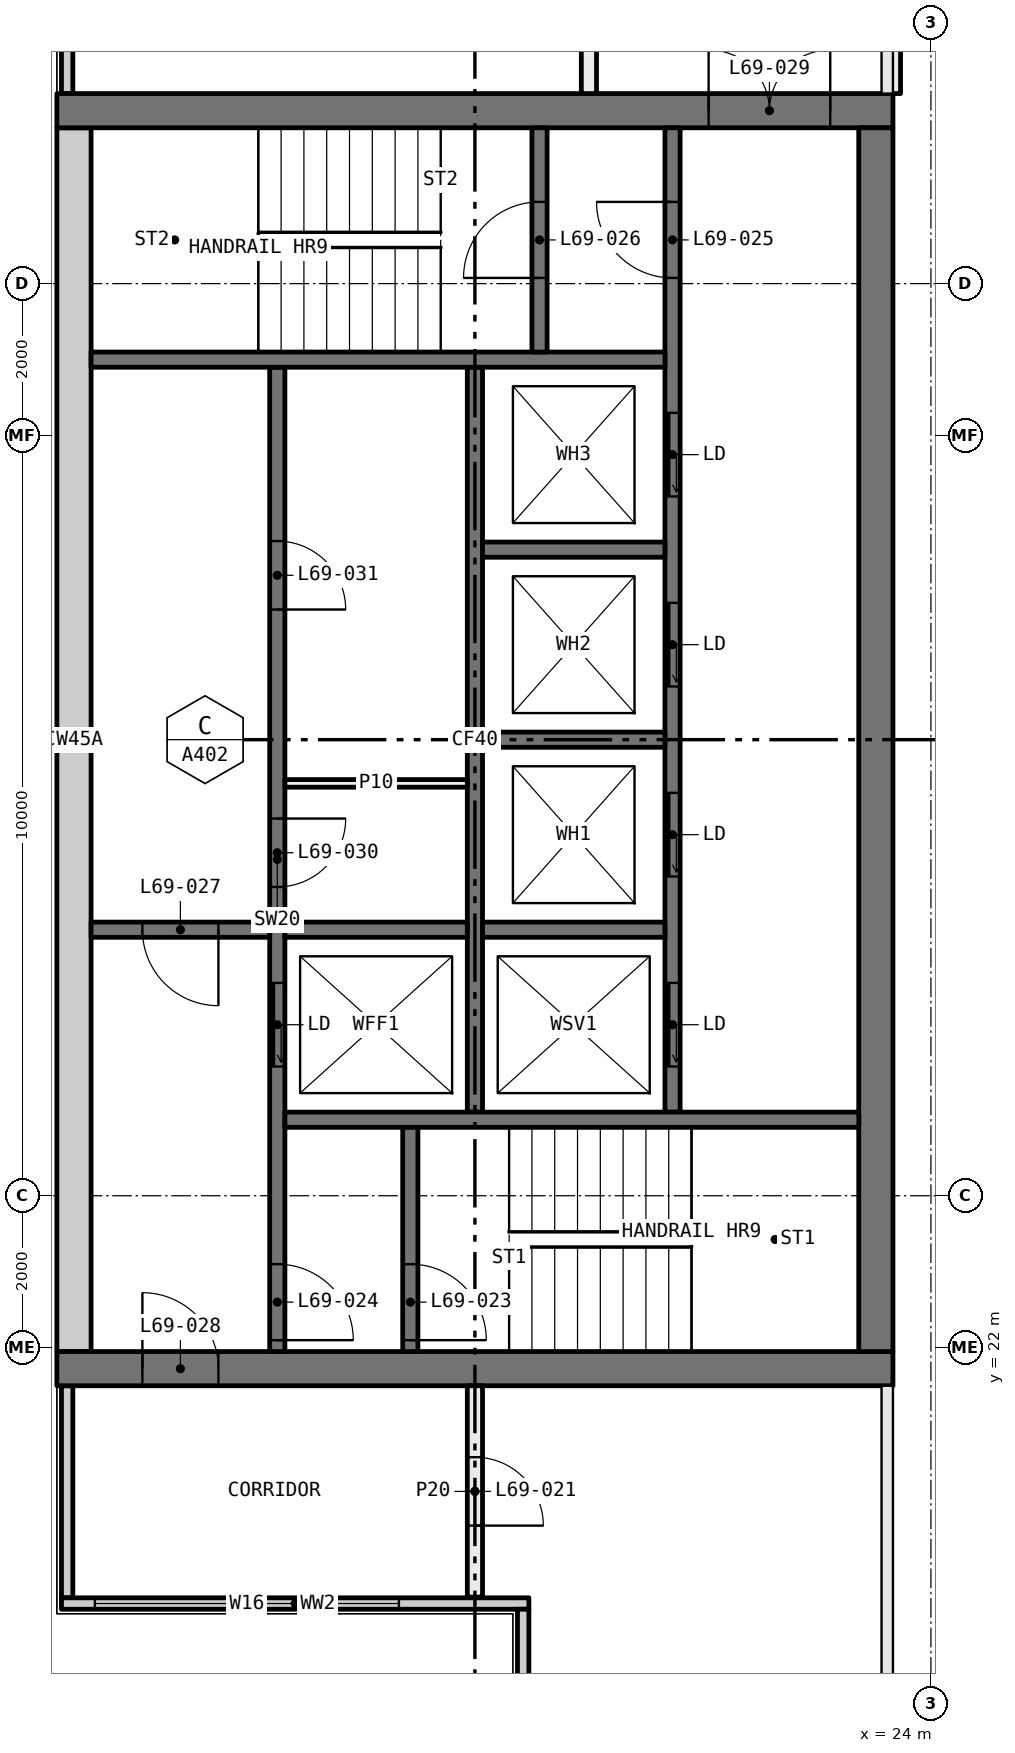
"""IFC4 building model, lengths in metres.
Left out: names, types, materials, properties, quantities, classifications, styles, units other than length and angle.
Written with IfcOpenShell. Run it as: python <this file> out.ifc"""

import sys

from ifc_helpers import new_model, si_unit, direction, frame, frame_2d, origin, place, context, subcontext, project, spatial, rectangle, extrude, element, fill, save


model = new_model("IFC4")
c1 = context("Model", 3, precision=1e-05, world=origin(), true_north=direction((0.0, 1.0)))
c2 = subcontext(c1, "Body", "Model", "MODEL_VIEW")
j1 = project(units=[si_unit("LENGTHUNIT", "METRE"), si_unit("PLANEANGLEUNIT", "RADIAN")], contexts=[c1])
p1 = place(None, origin())
s1 = spatial("IfcSite", under=j1, at=p1, CompositionType="ELEMENT")
p2 = place(p1, origin())
s2 = spatial("IfcBuilding", under=s1, at=p2, CompositionType="ELEMENT")
p3 = place(p2, frame((0.0, 0.0, 255.9)))
s3 = spatial("IfcBuildingStorey", under=s2, at=p3, CompositionType="ELEMENT", Elevation=255.9)
for number, where, z_axis, x_axis in (
    (1, (12.635, 18.71, 0.0), (0.0, 0.0, 1.0), (0.0, 1.0, 0.0)),
    (2, (12.635, 38.5, 0.0), (0.0, 0.0, 1.0), (0.0, 1.0, 0.0)),
):
    element("IfcWall", number, at=place(p3, frame(where, z_axis=z_axis, x_axis=x_axis)), inside=s3, PredefinedType="ELEMENTEDWALL", context=c2, shape_type="SweptSolid", body=[
        extrude(rectangle(XDim=2.79, YDim=0.15, at=frame_2d((1.395, 0.0))), origin(), (0.0, 0.0, 1.0), 3.05),
    ])
p4 = place(p3, frame((12.56, 18.635, 0.0), z_axis=(0.0, 0.0, 1.0), x_axis=(1.0, 0.0, 0.0)))
e3 = element("IfcWall", 3, at=p4, inside=s3, PredefinedType="ELEMENTEDWALL", context=c2, shape_type="SweptSolid", body=[
    extrude(rectangle(XDim=6.15, YDim=0.15, at=frame_2d((3.075, 0.0))), origin(), (0.0, 0.0, 1.0), 3.05),
])
p5 = place(p4, frame((0.44, 0.0, 0.45)))
e4 = element("IfcOpeningElement", 4, at=p5, cuts=e3, PredefinedType="OPENING", context=c2, shape_type="SweptSolid", body=[
    extrude(rectangle(XDim=4.0, YDim=2.55, at=frame_2d((2.0, 1.275))), frame((0.0, 0.085, 0.0), z_axis=(0.0, -1.0, 0.0), x_axis=(1.0, 0.0, 0.0)), (0.0, 0.0, 1.0), 0.17),
])
p6 = place(p3, frame((18.635, 12.71, 0.0), z_axis=(0.0, 0.0, 1.0), x_axis=(0.0, 1.0, 0.0)))
e5 = element("IfcWall", 5, at=p6, inside=s3, PredefinedType="ELEMENTEDWALL", context=c2, shape_type="SweptSolid", body=[
    extrude(rectangle(XDim=5.85, YDim=0.15, at=frame_2d((2.925, 0.0))), origin(), (0.0, 0.0, 1.0), 3.05),
])
p7 = place(p6, frame((0.29, 0.0, 0.45)))
e6 = element("IfcOpeningElement", 6, at=p7, cuts=e5, PredefinedType="OPENING", context=c2, shape_type="SweptSolid", body=[
    extrude(rectangle(XDim=4.0, YDim=2.55, at=frame_2d((2.0, 1.275))), frame((0.0, 0.085, 0.0), z_axis=(0.0, -1.0, 0.0), x_axis=(1.0, 0.0, 0.0)), (0.0, 0.0, 1.0), 0.17),
])
p8 = place(p3, frame((18.0, 21.5, 0.0), z_axis=(0.0, 0.0, 1.0), x_axis=(0.0, -1.0, 0.0)))
e7 = element("IfcWall", 7, at=p8, inside=s3, PredefinedType="PARTITIONING", context=c2, shape_type="SweptSolid", body=[
    extrude(rectangle(XDim=2.78, YDim=0.2, at=frame_2d((1.39, 0.0))), origin(), (0.0, 0.0, 1.0), 3.05),
])
p9 = place(p8, frame((0.94, 0.0, 0.0)))
e8 = element("IfcOpeningElement", 8, at=p9, cuts=e7, PredefinedType="OPENING", context=c2, shape_type="SweptSolid", body=[
    extrude(rectangle(XDim=0.9, YDim=2.1, at=frame_2d((0.45, 1.05))), frame((0.0, 0.11, 0.0), z_axis=(0.0, -1.0, 0.0), x_axis=(1.0, 0.0, 0.0)), (0.0, 0.0, 1.0), 0.22),
])
p10 = place(p3, frame((19.5, 38.5, 0.0), z_axis=(0.0, 0.0, 1.0), x_axis=(0.0, 1.0, 0.0)))
e9 = element("IfcWall", 9, at=p10, inside=s3, PredefinedType="PARTITIONING", context=c2, shape_type="SweptSolid", body=[
    extrude(rectangle(XDim=3.5, YDim=0.2, at=frame_2d((1.75, 0.0))), origin(), (0.0, 0.0, 1.0), 3.05),
])
p11 = place(p3, frame((23.5, 41.9, 0.0), z_axis=(0.0, 0.0, 1.0), x_axis=(0.0, -1.0, 0.0)))
e10 = element("IfcWall", 10, at=p11, inside=s3, PredefinedType="PARTITIONING", context=c2, shape_type="SweptSolid", body=[
    extrude(rectangle(XDim=3.4, YDim=0.2, at=frame_2d((1.7, 0.0))), origin(), (0.0, 0.0, 1.0), 3.05),
])
p12 = place(p3, frame((12.5, 21.725, 0.0), z_axis=(0.0, 0.0, 1.0), x_axis=(1.0, 0.0, 0.0)))
e11 = element("IfcWall", 11, at=p12, inside=s3, PredefinedType="SHEAR", context=c2, shape_type="SweptSolid", body=[
    extrude(rectangle(XDim=11.0, YDim=0.45, at=frame_2d((5.5, 0.0))), origin(), (0.0, 0.0, 1.0), 3.05),
])
p13 = place(p12, frame((1.125, 0.0, 0.0)))
e12 = element("IfcOpeningElement", 12, at=p13, cuts=e11, PredefinedType="OPENING", context=c2, shape_type="SweptSolid", body=[
    extrude(rectangle(XDim=1.0, YDim=2.1, at=frame_2d((0.5, 1.05))), frame((0.0, 0.235, 0.0), z_axis=(0.0, -1.0, 0.0), x_axis=(1.0, 0.0, 0.0)), (0.0, 0.0, 1.0), 0.47),
])
p14 = place(p3, frame((12.5, 38.275, 0.0), z_axis=(0.0, 0.0, 1.0), x_axis=(1.0, 0.0, 0.0)))
e13 = element("IfcWall", 13, at=p14, inside=s3, PredefinedType="SHEAR", context=c2, shape_type="SweptSolid", body=[
    extrude(rectangle(XDim=11.0, YDim=0.45, at=frame_2d((5.5, 0.0))), origin(), (0.0, 0.0, 1.0), 3.05),
])
p15 = place(p14, frame((8.575, 0.0, 0.0)))
e14 = element("IfcOpeningElement", 14, at=p15, cuts=e13, PredefinedType="OPENING", context=c2, shape_type="SweptSolid", body=[
    extrude(rectangle(XDim=1.6, YDim=2.1, at=frame_2d((0.8, 1.05))), frame((0.0, 0.235, 0.0), z_axis=(0.0, -1.0, 0.0), x_axis=(1.0, 0.0, 0.0)), (0.0, 0.0, 1.0), 0.47),
])
for number, where, z_axis, x_axis in (
    (15, (12.725, 21.95, 0.0), (0.0, 0.0, 1.0), (0.0, 1.0, 0.0)),
    (16, (23.275, 21.95, 0.0), (0.0, 0.0, 1.0), (0.0, 1.0, 0.0)),
):
    element("IfcWall", number, at=place(p3, frame(where, z_axis=z_axis, x_axis=x_axis)), inside=s3, PredefinedType="SHEAR", context=c2, shape_type="SweptSolid", body=[
        extrude(rectangle(XDim=16.1, YDim=0.45, at=frame_2d((8.05, 0.0))), origin(), (0.0, 0.0, 1.0), 3.05),
    ])
p16 = place(p3, frame((15.4, 21.95, 0.0), z_axis=(0.0, 0.0, 1.0), x_axis=(0.0, 1.0, 0.0)))
e17 = element("IfcWall", 17, at=p16, inside=s3, PredefinedType="SOLIDWALL", context=c2, shape_type="SweptSolid", body=[
    extrude(rectangle(XDim=12.95, YDim=0.2, at=frame_2d((6.475, 0.0))), origin(), (0.0, 0.0, 1.0), 3.05),
])
p17 = place(p16, frame((3.75, 0.0, 0.0)))
e18 = element("IfcOpeningElement", 18, at=p17, cuts=e17, PredefinedType="OPENING", context=c2, shape_type="SweptSolid", body=[
    extrude(rectangle(XDim=1.1, YDim=2.1, at=frame_2d((0.55, 1.05))), frame((0.0, 0.11, 0.0), z_axis=(0.0, -1.0, 0.0), x_axis=(1.0, 0.0, 0.0)), (0.0, 0.0, 1.0), 0.22),
])
p18 = place(p16, frame((0.15, 0.0, 0.0)))
e19 = element("IfcOpeningElement", 19, at=p18, cuts=e17, PredefinedType="OPENING", context=c2, shape_type="SweptSolid", body=[
    extrude(rectangle(XDim=1.0, YDim=2.1, at=frame_2d((0.5, 1.05))), frame((0.0, 0.11, 0.0), z_axis=(0.0, -1.0, 0.0), x_axis=(1.0, 0.0, 0.0)), (0.0, 0.0, 1.0), 0.22),
])
p19 = place(p16, frame((6.113, 0.0, 0.0)))
e20 = element("IfcOpeningElement", 20, at=p19, cuts=e17, PredefinedType="OPENING", context=c2, shape_type="SweptSolid", body=[
    extrude(rectangle(XDim=0.9, YDim=2.1, at=frame_2d((0.45, 1.05))), frame((0.0, 0.11, 0.0), z_axis=(0.0, -1.0, 0.0), x_axis=(1.0, 0.0, 0.0)), (0.0, 0.0, 1.0), 0.22),
])
p20 = place(p16, frame((9.762, 0.0, 0.0)))
e21 = element("IfcOpeningElement", 21, at=p20, cuts=e17, PredefinedType="OPENING", context=c2, shape_type="SweptSolid", body=[
    extrude(rectangle(XDim=0.9, YDim=2.1, at=frame_2d((0.45, 1.05))), frame((0.0, 0.11, 0.0), z_axis=(0.0, -1.0, 0.0), x_axis=(1.0, 0.0, 0.0)), (0.0, 0.0, 1.0), 0.22),
])
p21 = place(p3, frame((20.6, 25.1, 0.0), z_axis=(0.0, 0.0, 1.0), x_axis=(0.0, 1.0, 0.0)))
e22 = element("IfcWall", 22, at=p21, inside=s3, PredefinedType="SOLIDWALL", context=c2, shape_type="SweptSolid", body=[
    extrude(rectangle(XDim=12.95, YDim=0.2, at=frame_2d((6.475, 0.0))), origin(), (0.0, 0.0, 1.0), 3.05),
])
p22 = place(p21, frame((0.6, 0.0, 0.0)))
e23 = element("IfcOpeningElement", 23, at=p22, cuts=e22, PredefinedType="OPENING", context=c2, shape_type="SweptSolid", body=[
    extrude(rectangle(XDim=1.1, YDim=2.1, at=frame_2d((0.55, 1.05))), frame((0.0, 0.11, 0.0), z_axis=(0.0, -1.0, 0.0), x_axis=(1.0, 0.0, 0.0)), (0.0, 0.0, 1.0), 0.22),
])
p23 = place(p21, frame((3.1, 0.0, 0.0)))
e24 = element("IfcOpeningElement", 24, at=p23, cuts=e22, PredefinedType="OPENING", context=c2, shape_type="SweptSolid", body=[
    extrude(rectangle(XDim=1.1, YDim=2.1, at=frame_2d((0.55, 1.05))), frame((0.0, 0.11, 0.0), z_axis=(0.0, -1.0, 0.0), x_axis=(1.0, 0.0, 0.0)), (0.0, 0.0, 1.0), 0.22),
])
p24 = place(p21, frame((5.6, 0.0, 0.0)))
e25 = element("IfcOpeningElement", 25, at=p24, cuts=e22, PredefinedType="OPENING", context=c2, shape_type="SweptSolid", body=[
    extrude(rectangle(XDim=1.1, YDim=2.1, at=frame_2d((0.55, 1.05))), frame((0.0, 0.11, 0.0), z_axis=(0.0, -1.0, 0.0), x_axis=(1.0, 0.0, 0.0)), (0.0, 0.0, 1.0), 0.22),
])
p25 = place(p21, frame((8.1, 0.0, 0.0)))
e26 = element("IfcOpeningElement", 26, at=p25, cuts=e22, PredefinedType="OPENING", context=c2, shape_type="SweptSolid", body=[
    extrude(rectangle(XDim=1.1, YDim=2.1, at=frame_2d((0.55, 1.05))), frame((0.0, 0.11, 0.0), z_axis=(0.0, -1.0, 0.0), x_axis=(1.0, 0.0, 0.0)), (0.0, 0.0, 1.0), 0.22),
])
p26 = place(p21, frame((10.975, 0.0, 0.0)))
e27 = element("IfcOpeningElement", 27, at=p26, cuts=e22, PredefinedType="OPENING", context=c2, shape_type="SweptSolid", body=[
    extrude(rectangle(XDim=1.0, YDim=2.1, at=frame_2d((0.5, 1.05))), frame((0.0, 0.11, 0.0), z_axis=(0.0, -1.0, 0.0), x_axis=(1.0, 0.0, 0.0)), (0.0, 0.0, 1.0), 0.22),
])
p27 = place(p3, frame((18.0, 25.1, 0.0), z_axis=(0.0, 0.0, 1.0), x_axis=(0.0, 1.0, 0.0)))
e28 = element("IfcWall", 28, at=p27, inside=s3, PredefinedType="SOLIDWALL", context=c2, shape_type="SweptSolid", body=[
    extrude(rectangle(XDim=9.8, YDim=0.2, at=frame_2d((4.9, 0.0))), origin(), (0.0, 0.0, 1.0), 3.05),
])
for number, where, z_axis, x_axis in (
    (29, (15.5, 25.0, 0.0), (0.0, 0.0, 1.0), (1.0, 0.0, 0.0)),
    (30, (12.95, 35.0, 0.0), (0.0, 0.0, 1.0), (1.0, 0.0, 0.0)),
):
    element("IfcWall", number, at=place(p3, frame(where, z_axis=z_axis, x_axis=x_axis)), inside=s3, PredefinedType="SOLIDWALL", context=c2, shape_type="SweptSolid", body=[
        extrude(rectangle(XDim=7.55, YDim=0.2, at=frame_2d((3.775, 0.0))), origin(), (0.0, 0.0, 1.0), 3.05),
    ])
p28 = place(p3, frame((12.95, 27.5, 0.0), z_axis=(0.0, 0.0, 1.0), x_axis=(1.0, 0.0, 0.0)))
e31 = element("IfcWall", 31, at=p28, inside=s3, PredefinedType="SOLIDWALL", context=c2, shape_type="SweptSolid", body=[
    extrude(rectangle(XDim=2.35, YDim=0.2, at=frame_2d((1.175, 0.0))), origin(), (0.0, 0.0, 1.0), 3.05),
])
p29 = place(p28, frame((0.675, 0.0, 0.0)))
e32 = element("IfcOpeningElement", 32, at=p29, cuts=e31, PredefinedType="OPENING", context=c2, shape_type="SweptSolid", body=[
    extrude(rectangle(XDim=1.0, YDim=2.1, at=frame_2d((0.5, 1.05))), frame((0.0, 0.11, 0.0), z_axis=(0.0, -1.0, 0.0), x_axis=(1.0, 0.0, 0.0)), (0.0, 0.0, 1.0), 0.22),
])
p30 = place(p3, frame((17.15, 21.95, 0.0), z_axis=(0.0, 0.0, 1.0), x_axis=(0.0, 1.0, 0.0)))
e33 = element("IfcWall", 33, at=p30, inside=s3, PredefinedType="SOLIDWALL", context=c2, shape_type="SweptSolid", body=[
    extrude(rectangle(XDim=2.95, YDim=0.2, at=frame_2d((1.475, 0.0))), origin(), (0.0, 0.0, 1.0), 3.05),
])
p31 = place(p30, frame((0.15, 0.0, 0.0)))
e34 = element("IfcOpeningElement", 34, at=p31, cuts=e33, PredefinedType="OPENING", context=c2, shape_type="SweptSolid", body=[
    extrude(rectangle(XDim=1.0, YDim=2.1, at=frame_2d((0.5, 1.05))), frame((0.0, 0.11, 0.0), z_axis=(0.0, -1.0, 0.0), x_axis=(1.0, 0.0, 0.0)), (0.0, 0.0, 1.0), 0.22),
])
p32 = place(p3, frame((18.85, 35.1, 0.0), z_axis=(0.0, 0.0, 1.0), x_axis=(0.0, 1.0, 0.0)))
e35 = element("IfcWall", 35, at=p32, inside=s3, PredefinedType="SOLIDWALL", context=c2, shape_type="SweptSolid", body=[
    extrude(rectangle(XDim=2.95, YDim=0.2, at=frame_2d((1.475, 0.0))), origin(), (0.0, 0.0, 1.0), 3.05),
])
p33 = place(p32, frame((0.975, 0.0, 0.0)))
e36 = element("IfcOpeningElement", 36, at=p33, cuts=e35, PredefinedType="OPENING", context=c2, shape_type="SweptSolid", body=[
    extrude(rectangle(XDim=1.0, YDim=2.1, at=frame_2d((0.5, 1.05))), frame((0.0, 0.11, 0.0), z_axis=(0.0, -1.0, 0.0), x_axis=(1.0, 0.0, 0.0)), (0.0, 0.0, 1.0), 0.22),
])
for number, where, z_axis, x_axis in (
    (37, (15.5, 27.5, 0.0), (0.0, 0.0, 1.0), (1.0, 0.0, 0.0)),
    (38, (18.1, 27.5, 0.0), (0.0, 0.0, 1.0), (1.0, 0.0, 0.0)),
    (39, (18.1, 30.0, 0.0), (0.0, 0.0, 1.0), (1.0, 0.0, 0.0)),
    (40, (18.1, 32.5, 0.0), (0.0, 0.0, 1.0), (1.0, 0.0, 0.0)),
):
    element("IfcWall", number, at=place(p3, frame(where, z_axis=z_axis, x_axis=x_axis)), inside=s3, PredefinedType="SOLIDWALL", context=c2, shape_type="SweptSolid", body=[
        extrude(rectangle(XDim=2.4, YDim=0.2, at=frame_2d((1.2, 0.0))), origin(), (0.0, 0.0, 1.0), 3.05),
    ])
p34 = place(p3, frame((15.5, 29.425, 0.0), z_axis=(0.0, 0.0, 1.0), x_axis=(1.0, 0.0, 0.0)))
e41 = element("IfcWall", 41, at=p34, inside=s3, PredefinedType="PARTITIONING", context=c2, shape_type="SweptSolid", body=[
    extrude(rectangle(XDim=2.4, YDim=0.1, at=frame_2d((1.2, 0.0))), origin(), (0.0, 0.0, 1.0), 3.05),
])
p35 = place(p5, origin())
e42 = element("IfcWindow", 42, at=p35, inside=s3, PartitioningType="SINGLE_PANEL", PredefinedType="WINDOW", context=c2, shape_type="SweptSolid", body=[
    extrude(rectangle(XDim=4.0, YDim=2.55, at=frame_2d((2.0, 1.275))), frame((0.0, 0.03, 0.0), z_axis=(0.0, -1.0, 0.0), x_axis=(1.0, 0.0, 0.0)), (0.0, 0.0, 1.0), 0.06),
])
fill(e4, e42)
p36 = place(p9, origin())
e43 = element("IfcDoor", 43, at=p36, inside=s3, OperationType="SINGLE_SWING_LEFT", PredefinedType="DOOR", context=c2, shape_type="SweptSolid", body=[
    extrude(rectangle(XDim=0.9, YDim=2.1, at=frame_2d((0.45, 1.05))), frame((0.0, 0.025, 0.0), z_axis=(0.0, -1.0, 0.0), x_axis=(1.0, 0.0, 0.0)), (0.0, 0.0, 1.0), 0.05),
])
fill(e8, e43)
p37 = place(p22, origin())
e44 = element("IfcDoor", 44, at=p37, inside=s3, OperationType="SLIDING_TO_LEFT", PredefinedType="DOOR", context=c2, shape_type="SweptSolid", body=[
    extrude(rectangle(XDim=1.1, YDim=2.1, at=frame_2d((0.55, 1.05))), frame((0.0, 0.025, 0.0), z_axis=(0.0, -1.0, 0.0), x_axis=(1.0, 0.0, 0.0)), (0.0, 0.0, 1.0), 0.05),
])
fill(e23, e44)
p38 = place(p23, origin())
e45 = element("IfcDoor", 45, at=p38, inside=s3, OperationType="SLIDING_TO_LEFT", PredefinedType="DOOR", context=c2, shape_type="SweptSolid", body=[
    extrude(rectangle(XDim=1.1, YDim=2.1, at=frame_2d((0.55, 1.05))), frame((0.0, 0.025, 0.0), z_axis=(0.0, -1.0, 0.0), x_axis=(1.0, 0.0, 0.0)), (0.0, 0.0, 1.0), 0.05),
])
fill(e24, e45)
p39 = place(p24, origin())
e46 = element("IfcDoor", 46, at=p39, inside=s3, OperationType="SLIDING_TO_LEFT", PredefinedType="DOOR", context=c2, shape_type="SweptSolid", body=[
    extrude(rectangle(XDim=1.1, YDim=2.1, at=frame_2d((0.55, 1.05))), frame((0.0, 0.025, 0.0), z_axis=(0.0, -1.0, 0.0), x_axis=(1.0, 0.0, 0.0)), (0.0, 0.0, 1.0), 0.05),
])
fill(e25, e46)
p40 = place(p25, origin())
e47 = element("IfcDoor", 47, at=p40, inside=s3, OperationType="SLIDING_TO_LEFT", PredefinedType="DOOR", context=c2, shape_type="SweptSolid", body=[
    extrude(rectangle(XDim=1.1, YDim=2.1, at=frame_2d((0.55, 1.05))), frame((0.0, 0.025, 0.0), z_axis=(0.0, -1.0, 0.0), x_axis=(1.0, 0.0, 0.0)), (0.0, 0.0, 1.0), 0.05),
])
fill(e26, e47)
p41 = place(p17, origin())
e48 = element("IfcDoor", 48, at=p41, inside=s3, OperationType="SLIDING_TO_LEFT", PredefinedType="DOOR", context=c2, shape_type="SweptSolid", body=[
    extrude(rectangle(XDim=1.1, YDim=2.1, at=frame_2d((0.55, 1.05))), frame((0.0, 0.025, 0.0), z_axis=(0.0, -1.0, 0.0), x_axis=(1.0, 0.0, 0.0)), (0.0, 0.0, 1.0), 0.05),
])
fill(e18, e48)
p42 = place(p31, frame((1.0, 0.0, 0.0), x_axis=(-1.0, 0.0, 0.0)))
e49 = element("IfcDoor", 49, at=p42, inside=s3, OperationType="SINGLE_SWING_LEFT", PredefinedType="DOOR", context=c2, shape_type="SweptSolid", body=[
    extrude(rectangle(XDim=1.0, YDim=2.1, at=frame_2d((0.5, 1.05))), frame((0.0, 0.025, 0.0), z_axis=(0.0, -1.0, 0.0), x_axis=(1.0, 0.0, 0.0)), (0.0, 0.0, 1.0), 0.05),
])
fill(e34, e49)
p43 = place(p18, frame((1.0, 0.0, 0.0), x_axis=(-1.0, 0.0, 0.0)))
e50 = element("IfcDoor", 50, at=p43, inside=s3, OperationType="SINGLE_SWING_LEFT", PredefinedType="DOOR", context=c2, shape_type="SweptSolid", body=[
    extrude(rectangle(XDim=1.0, YDim=2.1, at=frame_2d((0.5, 1.05))), frame((0.0, 0.025, 0.0), z_axis=(0.0, -1.0, 0.0), x_axis=(1.0, 0.0, 0.0)), (0.0, 0.0, 1.0), 0.05),
])
fill(e19, e50)
p44 = place(p26, origin())
e51 = element("IfcDoor", 51, at=p44, inside=s3, OperationType="SINGLE_SWING_LEFT", PredefinedType="DOOR", context=c2, shape_type="SweptSolid", body=[
    extrude(rectangle(XDim=1.0, YDim=2.1, at=frame_2d((0.5, 1.05))), frame((0.0, 0.025, 0.0), z_axis=(0.0, -1.0, 0.0), x_axis=(1.0, 0.0, 0.0)), (0.0, 0.0, 1.0), 0.05),
])
fill(e27, e51)
p45 = place(p33, origin())
e52 = element("IfcDoor", 52, at=p45, inside=s3, OperationType="SINGLE_SWING_RIGHT", PredefinedType="DOOR", context=c2, shape_type="SweptSolid", body=[
    extrude(rectangle(XDim=1.0, YDim=2.1, at=frame_2d((0.5, 1.05))), frame((0.0, 0.025, 0.0), z_axis=(0.0, -1.0, 0.0), x_axis=(1.0, 0.0, 0.0)), (0.0, 0.0, 1.0), 0.05),
])
fill(e36, e52)
p46 = place(p29, frame((1.0, 0.0, 0.0), x_axis=(-1.0, 0.0, 0.0)))
e53 = element("IfcDoor", 53, at=p46, inside=s3, OperationType="SINGLE_SWING_RIGHT", PredefinedType="DOOR", context=c2, shape_type="SweptSolid", body=[
    extrude(rectangle(XDim=1.0, YDim=2.1, at=frame_2d((0.5, 1.05))), frame((0.0, 0.025, 0.0), z_axis=(0.0, -1.0, 0.0), x_axis=(1.0, 0.0, 0.0)), (0.0, 0.0, 1.0), 0.05),
])
fill(e32, e53)
p47 = place(p13, origin())
e54 = element("IfcDoor", 54, at=p47, inside=s3, OperationType="SINGLE_SWING_RIGHT", PredefinedType="DOOR", context=c2, shape_type="SweptSolid", body=[
    extrude(rectangle(XDim=1.0, YDim=2.1, at=frame_2d((0.5, 1.05))), frame((0.0, 0.025, 0.0), z_axis=(0.0, -1.0, 0.0), x_axis=(1.0, 0.0, 0.0)), (0.0, 0.0, 1.0), 0.05),
])
fill(e12, e54)
p48 = place(p15, origin())
e55 = element("IfcDoor", 55, at=p48, inside=s3, OperationType="DOUBLE_DOOR_SINGLE_SWING", PredefinedType="DOOR", context=c2, shape_type="SweptSolid", body=[
    extrude(rectangle(XDim=1.6, YDim=2.1, at=frame_2d((0.8, 1.05))), frame((0.0, 0.025, 0.0), z_axis=(0.0, -1.0, 0.0), x_axis=(1.0, 0.0, 0.0)), (0.0, 0.0, 1.0), 0.05),
])
fill(e14, e55)
p49 = place(p19, frame((0.9, 0.0, 0.0), x_axis=(-1.0, 0.0, 0.0)))
e56 = element("IfcDoor", 56, at=p49, inside=s3, OperationType="SINGLE_SWING_RIGHT", PredefinedType="DOOR", context=c2, shape_type="SweptSolid", body=[
    extrude(rectangle(XDim=0.9, YDim=2.1, at=frame_2d((0.45, 1.05))), frame((0.0, 0.025, 0.0), z_axis=(0.0, -1.0, 0.0), x_axis=(1.0, 0.0, 0.0)), (0.0, 0.0, 1.0), 0.05),
])
fill(e20, e56)
p50 = place(p20, frame((0.9, 0.0, 0.0), x_axis=(-1.0, 0.0, 0.0)))
e57 = element("IfcDoor", 57, at=p50, inside=s3, OperationType="SINGLE_SWING_LEFT", PredefinedType="DOOR", context=c2, shape_type="SweptSolid", body=[
    extrude(rectangle(XDim=0.9, YDim=2.1, at=frame_2d((0.45, 1.05))), frame((0.0, 0.025, 0.0), z_axis=(0.0, -1.0, 0.0), x_axis=(1.0, 0.0, 0.0)), (0.0, 0.0, 1.0), 0.05),
])
fill(e21, e57)
save(model, sys.argv[1])
